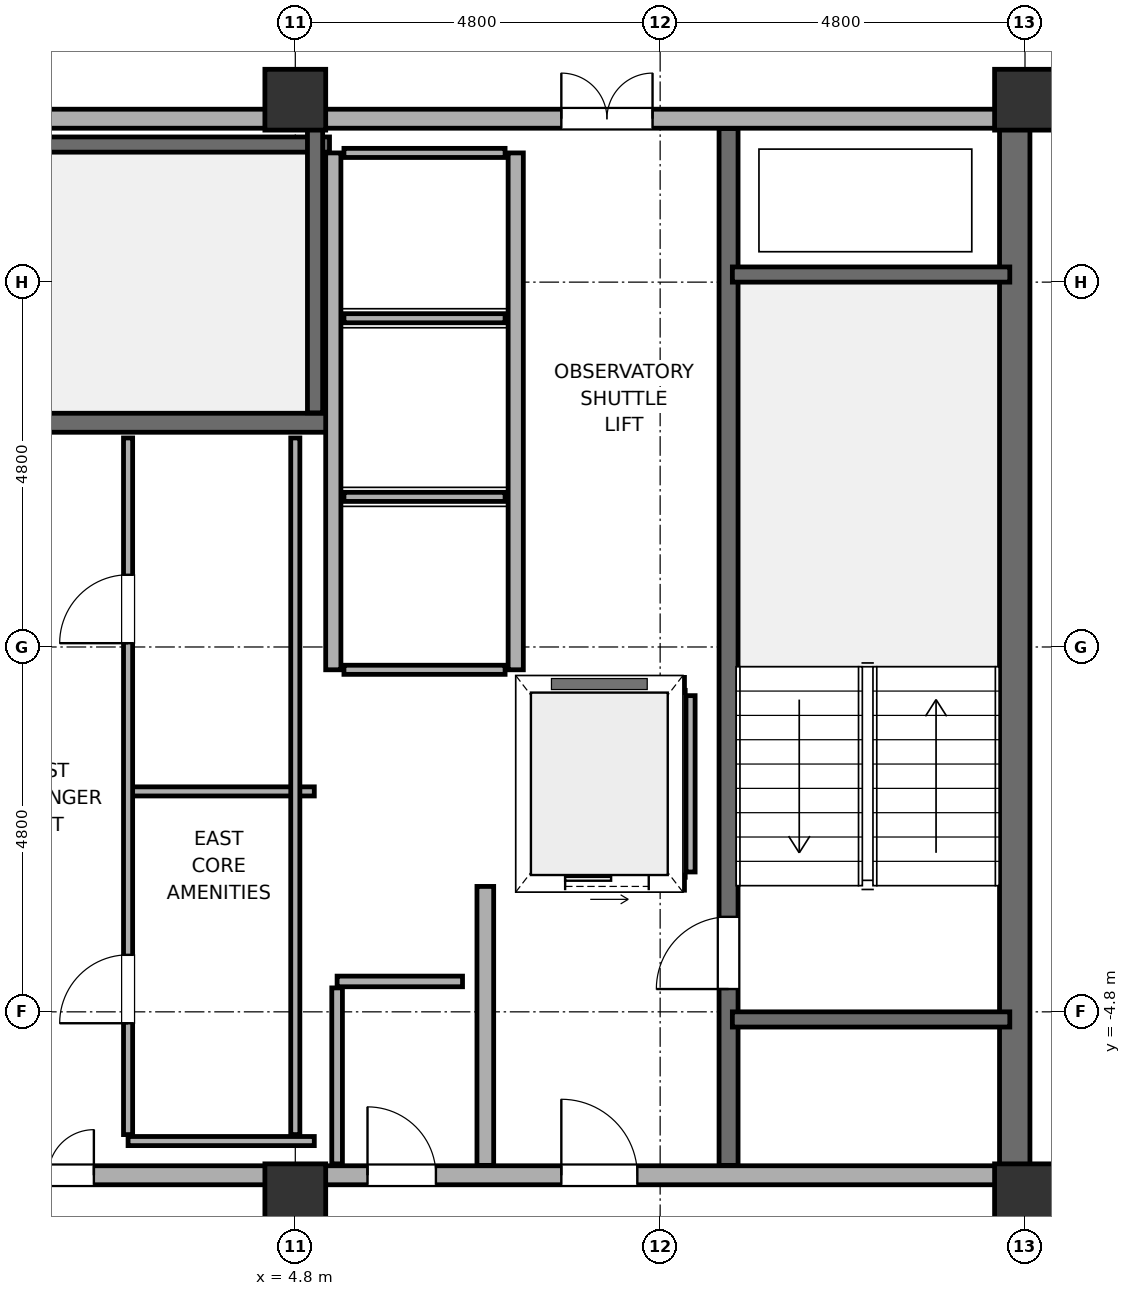
"""IFC4 building model, lengths in metres.
Left out: names, types, materials, properties, quantities, classifications, styles, units other than length and angle.
Written with IfcOpenShell. Run it as: python <this file> out.ifc"""

import sys

from ifc_helpers import new_model, si_unit, direction, frame, frame_2d, origin, origin_2d, place, context, subcontext, project, spatial, rectangle, hollow_rectangle, extrude, element, fill, save


model = new_model("IFC4")
c1 = context("Model", 3, precision=1e-05, world=origin(), true_north=direction((0.0, 1.0)))
c2 = subcontext(c1, "Body", "Model", "MODEL_VIEW")
j1 = project(units=[si_unit("LENGTHUNIT", "METRE"), si_unit("PLANEANGLEUNIT", "RADIAN")], contexts=[c1])
p1 = place(None, origin())
s1 = spatial("IfcSite", under=j1, at=p1, CompositionType="ELEMENT")
p2 = place(p1, origin())
s2 = spatial("IfcBuilding", under=s1, at=p2, CompositionType="ELEMENT")
p3 = place(p2, frame((0.0, 0.0, 30.0)))
s3 = spatial("IfcBuildingStorey", under=s2, at=p3, CompositionType="ELEMENT", Elevation=30.0)
for number, where, z_axis, x_axis in (
    (1, (4.8, -7.2, 0.0), (0.0, 0.0, 1.0), (1.0, 0.0, 0.0)),
    (2, (4.8, 7.2, 0.0), (0.0, 0.0, 1.0), (1.0, 0.0, 0.0)),
    (3, (14.4, -7.2, 0.0), (0.0, 0.0, 1.0), (1.0, 0.0, 0.0)),
    (4, (14.4, 7.2, 0.0), (0.0, 0.0, 1.0), (1.0, 0.0, 0.0)),
):
    element("IfcColumn", number, at=place(p3, frame(where, z_axis=z_axis, x_axis=x_axis)), inside=s3, PredefinedType="COLUMN", context=c2, shape_type="SweptSolid", body=[
        extrude(hollow_rectangle(XDim=0.8, YDim=0.8, WallThickness=0.036, at=origin_2d()), origin(), (0.0, 0.0, 1.0), 3.7),
    ])
p4 = place(p3, frame((14.265, -7.2, -0.18), z_axis=(0.0, 0.0, 1.0), x_axis=(0.0, 1.0, 0.0)))
e5 = element("IfcWall", 5, at=p4, inside=s3, PredefinedType="SHEAR", context=c2, shape_type="SweptSolid", body=[
    extrude(rectangle(XDim=14.4, YDim=0.4, at=frame_2d((7.2, 0.0))), origin(), (0.0, 0.0, 1.0), 3.7),
])
p5 = place(p3, frame((-4.6, -6.95, 0.0), z_axis=(0.0, 0.0, 1.0), x_axis=(1.0, 0.0, 0.0)))
e6 = element("IfcWall", 6, at=p5, inside=s3, PredefinedType="SOLIDWALL", context=c2, shape_type="SweptSolid", body=[
    extrude(rectangle(XDim=9.2, YDim=0.25, at=frame_2d((4.6, 0.0))), origin(), (0.0, 0.0, 1.0), 2.32),
])
p6 = place(p5, frame((0.8, 0.0, 0.0)))
e7 = element("IfcOpeningElement", 7, at=p6, cuts=e6, PredefinedType="OPENING", context=c2, shape_type="SweptSolid", body=[
    extrude(rectangle(XDim=1.2, YDim=2.2, at=frame_2d((0.6, 1.1))), frame((0.0, 0.14, 0.0), z_axis=(0.0, -1.0, 0.0), x_axis=(1.0, 0.0, 0.0)), (0.0, 0.0, 1.0), 0.28),
])
p7 = place(p5, frame((5.55, 0.0, 0.0)))
e8 = element("IfcOpeningElement", 8, at=p7, cuts=e6, PredefinedType="OPENING", context=c2, shape_type="SweptSolid", body=[
    extrude(rectangle(XDim=1.2, YDim=2.2, at=frame_2d((0.6, 1.1))), frame((0.0, 0.14, 0.0), z_axis=(0.0, -1.0, 0.0), x_axis=(1.0, 0.0, 0.0)), (0.0, 0.0, 1.0), 0.28),
])
p8 = place(p3, frame((4.8, -6.95, 0.0), z_axis=(0.0, 0.0, 1.0), x_axis=(1.0, 0.0, 0.0)))
e9 = element("IfcWall", 9, at=p8, inside=s3, PredefinedType="SOLIDWALL", context=c2, shape_type="SweptSolid", body=[
    extrude(rectangle(XDim=9.4, YDim=0.25, at=frame_2d((4.7, 0.0))), origin(), (0.0, 0.0, 1.0), 2.12),
])
p9 = place(p8, frame((3.5, 0.0, 0.0)))
e10 = element("IfcOpeningElement", 10, at=p9, cuts=e9, PredefinedType="OPENING", context=c2, shape_type="SweptSolid", body=[
    extrude(rectangle(XDim=1.0, YDim=2.02, at=frame_2d((0.5, 1.01))), frame((0.0, 0.14, 0.0), z_axis=(0.0, -1.0, 0.0), x_axis=(1.0, 0.0, 0.0)), (0.0, 0.0, 1.0), 0.28),
])
p10 = place(p8, frame((0.95, 0.0, 0.0)))
e11 = element("IfcOpeningElement", 11, at=p10, cuts=e9, PredefinedType="OPENING", context=c2, shape_type="SweptSolid", body=[
    extrude(rectangle(XDim=0.9, YDim=2.02, at=frame_2d((0.45, 1.01))), frame((0.0, 0.14, 0.0), z_axis=(0.0, -1.0, 0.0), x_axis=(1.0, 0.0, 0.0)), (0.0, 0.0, 1.0), 0.28),
])
p11 = place(p3, frame((-4.6, 6.95, 0.0), z_axis=(0.0, 0.0, 1.0), x_axis=(1.0, 0.0, 0.0)))
e12 = element("IfcWall", 12, at=p11, inside=s3, PredefinedType="SOLIDWALL", context=c2, shape_type="SweptSolid", body=[
    extrude(rectangle(XDim=9.2, YDim=0.25, at=frame_2d((4.6, 0.0))), origin(), (0.0, 0.0, 1.0), 2.12),
])
p12 = place(p3, frame((4.8, 6.95, 0.0), z_axis=(0.0, 0.0, 1.0), x_axis=(1.0, 0.0, 0.0)))
e13 = element("IfcWall", 13, at=p12, inside=s3, PredefinedType="SOLIDWALL", context=c2, shape_type="SweptSolid", body=[
    extrude(rectangle(XDim=9.4, YDim=0.25, at=frame_2d((4.7, 0.0))), origin(), (0.0, 0.0, 1.0), 2.12),
])
p13 = place(p12, frame((3.5, 0.0, 0.0)))
e14 = element("IfcOpeningElement", 14, at=p13, cuts=e13, PredefinedType="OPENING", context=c2, shape_type="SweptSolid", body=[
    extrude(rectangle(XDim=1.2, YDim=2.02, at=frame_2d((0.6, 1.01))), frame((0.0, 0.14, 0.0), z_axis=(0.0, -1.0, 0.0), x_axis=(1.0, 0.0, 0.0)), (0.0, 0.0, 1.0), 0.28),
])
p14 = place(p3, frame((7.3, -6.82, 0.0), z_axis=(0.0, 0.0, 1.0), x_axis=(0.0, 1.0, 0.0)))
e15 = element("IfcWall", 15, at=p14, inside=s3, PredefinedType="SOLIDWALL", context=c2, shape_type="SweptSolid", body=[
    extrude(rectangle(XDim=3.67, YDim=0.22, at=frame_2d((1.835, 0.0))), origin(), (0.0, 0.0, 1.0), 2.12),
])
p15 = place(p3, frame((10.5, -6.82, -0.18), z_axis=(0.0, 0.0, 1.0), x_axis=(0.0, 1.0, 0.0)))
e16 = element("IfcWall", 16, at=p15, inside=s3, PredefinedType="SOLIDWALL", context=c2, shape_type="SweptSolid", body=[
    extrude(rectangle(XDim=13.64, YDim=0.25, at=frame_2d((6.82, 0.0))), origin(), (0.0, 0.0, 1.0), 3.7),
])
p16 = place(p15, frame((2.32, 0.0, 0.18)))
e17 = element("IfcOpeningElement", 17, at=p16, cuts=e16, PredefinedType="OPENING", context=c2, shape_type="SweptSolid", body=[
    extrude(rectangle(XDim=0.95, YDim=2.15, at=frame_2d((0.475, 1.075))), frame((0.0, 0.14, 0.0), z_axis=(0.0, -1.0, 0.0), x_axis=(1.0, 0.0, 0.0)), (0.0, 0.0, 1.0), 0.28),
])
for number, where, z_axis, x_axis in (
    (18, (10.55, -4.9, -0.18), (0.0, 0.0, 1.0), (1.0, 0.0, 0.0)),
    (19, (10.55, 4.9, -0.18), (0.0, 0.0, 1.0), (1.0, 0.0, 0.0)),
):
    element("IfcWall", number, at=place(p3, frame(where, z_axis=z_axis, x_axis=x_axis)), inside=s3, PredefinedType="SOLIDWALL", context=c2, shape_type="SweptSolid", body=[
        extrude(rectangle(XDim=3.65, YDim=0.2, at=frame_2d((1.825, 0.0))), origin(), (0.0, 0.0, 1.0), 3.7),
    ])
p17 = place(p3, frame((-4.65, 2.95, -0.18), z_axis=(0.0, 0.0, 1.0), x_axis=(1.0, 0.0, 0.0)))
e20 = element("IfcWall", 20, at=p17, inside=s3, PredefinedType="SOLIDWALL", context=c2, shape_type="SweptSolid", body=[
    extrude(rectangle(XDim=9.9, YDim=0.25, at=frame_2d((4.95, 0.0))), origin(), (0.0, 0.0, 1.0), 3.7),
])
p18 = place(p17, frame((0.65, 0.0, 0.18)))
e21 = element("IfcOpeningElement", 21, at=p18, cuts=e20, PredefinedType="OPENING", context=c2, shape_type="SweptSolid", body=[
    extrude(rectangle(XDim=0.95, YDim=2.15, at=frame_2d((0.475, 1.075))), frame((0.0, 0.14, 0.0), z_axis=(0.0, -1.0, 0.0), x_axis=(1.0, 0.0, 0.0)), (0.0, 0.0, 1.0), 0.28),
])
p19 = place(p3, frame((-4.65, 6.61, -0.18), z_axis=(0.0, 0.0, 1.0), x_axis=(1.0, 0.0, 0.0)))
e22 = element("IfcWall", 22, at=p19, inside=s3, PredefinedType="SOLIDWALL", context=c2, shape_type="SweptSolid", body=[
    extrude(rectangle(XDim=9.9, YDim=0.2, at=frame_2d((4.95, 0.0))), origin(), (0.0, 0.0, 1.0), 3.7),
])
p20 = place(p3, frame((5.06, 3.08, -0.18), z_axis=(0.0, 0.0, 1.0), x_axis=(0.0, 1.0, 0.0)))
e23 = element("IfcWall", 23, at=p20, inside=s3, PredefinedType="SOLIDWALL", context=c2, shape_type="SweptSolid", body=[
    extrude(rectangle(XDim=3.74, YDim=0.2, at=frame_2d((1.87, 0.0))), origin(), (0.0, 0.0, 1.0), 3.7),
])
for number, where, z_axis, x_axis in (
    (24, (7.7, -0.3, 0.0), (0.0, 0.0, 1.0), (0.0, 1.0, 0.0)),
    (25, (5.3, -0.3, 0.0), (0.0, 0.0, 1.0), (0.0, 1.0, 0.0)),
):
    element("IfcWall", number, at=place(p3, frame(where, z_axis=z_axis, x_axis=x_axis)), inside=s3, PredefinedType="SOLIDWALL", context=c2, shape_type="SweptSolid", body=[
        extrude(rectangle(XDim=6.8, YDim=0.2, at=frame_2d((3.4, 0.0))), origin(), (0.0, 0.0, 1.0), 3.52),
    ])
for number, where, z_axis, x_axis in (
    (26, (5.44, -0.3, 0.0), (0.0, 0.0, 1.0), (1.0, 0.0, 0.0)),
    (27, (5.44, 1.975, 0.0), (0.0, 0.0, 1.0), (1.0, 0.0, 0.0)),
    (28, (5.44, 4.325, 0.0), (0.0, 0.0, 1.0), (1.0, 0.0, 0.0)),
    (29, (5.44, 6.5, 0.0), (0.0, 0.0, 1.0), (1.0, 0.0, 0.0)),
):
    element("IfcWall", number, at=place(p3, frame(where, z_axis=z_axis, x_axis=x_axis)), inside=s3, PredefinedType="PARTITIONING", context=c2, shape_type="SweptSolid", body=[
        extrude(rectangle(XDim=2.12, YDim=0.12, at=frame_2d((1.06, 0.0))), origin(), (0.0, 0.0, 1.0), 3.52),
    ])
p21 = place(p3, frame((7.88, -3.1, 0.0), z_axis=(0.0, 0.0, 1.0), x_axis=(1.0, 0.0, 0.0)))
e30 = element("IfcWall", 30, at=p21, inside=s3, PredefinedType="SOLIDWALL", context=c2, shape_type="SweptSolid", body=[
    extrude(rectangle(XDim=2.04, YDim=0.2, at=frame_2d((1.02, 0.0))), origin(), (0.0, 0.0, 1.0), 3.52),
])
p22 = place(p21, frame((0.47, 0.0, 0.0)))
e31 = element("IfcOpeningElement", 31, at=p22, cuts=e30, PredefinedType="OPENING", context=c2, shape_type="SweptSolid", body=[
    extrude(rectangle(XDim=1.1, YDim=2.2, at=frame_2d((0.55, 1.1))), frame((0.0, 0.115, 0.0), z_axis=(0.0, -1.0, 0.0), x_axis=(1.0, 0.0, 0.0)), (0.0, 0.0, 1.0), 0.23),
])
p23 = place(p3, frame((7.88, -0.5, 0.0), z_axis=(0.0, 0.0, 1.0), x_axis=(1.0, 0.0, 0.0)))
e32 = element("IfcWall", 32, at=p23, inside=s3, PredefinedType="SOLIDWALL", context=c2, shape_type="SweptSolid", body=[
    extrude(rectangle(XDim=2.04, YDim=0.2, at=frame_2d((1.02, 0.0))), origin(), (0.0, 0.0, 1.0), 3.52),
])
for number, where, z_axis, x_axis in (
    (33, (7.8, -2.96, 0.0), (0.0, 0.0, 1.0), (0.0, 1.0, 0.0)),
    (34, (10.0, -2.96, 0.0), (0.0, 0.0, 1.0), (0.0, 1.0, 0.0)),
):
    element("IfcWall", number, at=place(p3, frame(where, z_axis=z_axis, x_axis=x_axis)), inside=s3, PredefinedType="PARTITIONING", context=c2, shape_type="SweptSolid", body=[
        extrude(rectangle(XDim=2.32, YDim=0.12, at=frame_2d((1.16, 0.0))), origin(), (0.0, 0.0, 1.0), 3.52),
    ])
p24 = place(p3, frame((2.6, -6.5, 0.0), z_axis=(0.0, 0.0, 1.0), x_axis=(1.0, 0.0, 0.0)))
e35 = element("IfcWall", 35, at=p24, inside=s3, PredefinedType="PARTITIONING", context=c2, shape_type="SweptSolid", body=[
    extrude(rectangle(XDim=2.45, YDim=0.12, at=frame_2d((1.225, 0.0))), origin(), (0.0, 0.0, 1.0), 3.52),
])
p25 = place(p3, frame((5.35, -4.4, 0.0), z_axis=(0.0, 0.0, 1.0), x_axis=(1.0, 0.0, 0.0)))
e36 = element("IfcWall", 36, at=p25, inside=s3, PredefinedType="PLUMBINGWALL", context=c2, shape_type="SweptSolid", body=[
    extrude(rectangle(XDim=1.65, YDim=0.14, at=frame_2d((0.825, 0.0))), origin(), (0.0, 0.0, 1.0), 3.52),
])
p26 = place(p3, frame((2.6, -1.9, 0.0), z_axis=(0.0, 0.0, 1.0), x_axis=(1.0, 0.0, 0.0)))
e37 = element("IfcWall", 37, at=p26, inside=s3, PredefinedType="PARTITIONING", context=c2, shape_type="SweptSolid", body=[
    extrude(rectangle(XDim=2.45, YDim=0.12, at=frame_2d((1.225, 0.0))), origin(), (0.0, 0.0, 1.0), 3.52),
])
p27 = place(p3, frame((2.6, -6.415, 0.0), z_axis=(0.0, 0.0, 1.0), x_axis=(0.0, 1.0, 0.0)))
e38 = element("IfcWall", 38, at=p27, inside=s3, PredefinedType="PARTITIONING", context=c2, shape_type="SweptSolid", body=[
    extrude(rectangle(XDim=9.165, YDim=0.12, at=frame_2d((4.583, 0.0))), origin(), (0.0, 0.0, 1.0), 3.52),
])
p28 = place(p27, frame((1.465, 0.0, 0.0)))
e39 = element("IfcOpeningElement", 39, at=p28, cuts=e38, PredefinedType="OPENING", context=c2, shape_type="SweptSolid", body=[
    extrude(rectangle(XDim=0.9, YDim=2.1, at=frame_2d((0.45, 1.05))), frame((0.0, 0.075, 0.0), z_axis=(0.0, -1.0, 0.0), x_axis=(1.0, 0.0, 0.0)), (0.0, 0.0, 1.0), 0.15),
])
p29 = place(p27, frame((6.465, 0.0, 0.0)))
e40 = element("IfcOpeningElement", 40, at=p29, cuts=e38, PredefinedType="OPENING", context=c2, shape_type="SweptSolid", body=[
    extrude(rectangle(XDim=0.9, YDim=2.1, at=frame_2d((0.45, 1.05))), frame((0.0, 0.075, 0.0), z_axis=(0.0, -1.0, 0.0), x_axis=(1.0, 0.0, 0.0)), (0.0, 0.0, 1.0), 0.15),
])
p30 = place(p3, frame((4.8, -6.415, 0.0), z_axis=(0.0, 0.0, 1.0), x_axis=(0.0, 1.0, 0.0)))
e41 = element("IfcWall", 41, at=p30, inside=s3, PredefinedType="PARTITIONING", context=c2, shape_type="SweptSolid", body=[
    extrude(rectangle(XDim=9.165, YDim=0.12, at=frame_2d((4.583, 0.0))), origin(), (0.0, 0.0, 1.0), 3.52),
])
p31 = place(p3, frame((5.35, -6.8, 0.0), z_axis=(0.0, 0.0, 1.0), x_axis=(0.0, 1.0, 0.0)))
e42 = element("IfcWall", 42, at=p31, inside=s3, PredefinedType="PLUMBINGWALL", context=c2, shape_type="SweptSolid", body=[
    extrude(rectangle(XDim=2.315, YDim=0.14, at=frame_2d((1.157, 0.0))), origin(), (0.0, 0.0, 1.0), 2.12),
])
p32 = place(p9, origin())
e43 = element("IfcDoor", 43, at=p32, inside=s3, OperationType="SINGLE_SWING_LEFT", PredefinedType="DOOR", context=c2, shape_type="SweptSolid", body=[
    extrude(rectangle(XDim=1.0, YDim=2.02, at=frame_2d((0.5, 1.01))), frame((0.0, 0.025, 0.0), z_axis=(0.0, -1.0, 0.0), x_axis=(1.0, 0.0, 0.0)), (0.0, 0.0, 1.0), 0.05),
])
fill(e10, e43)
p33 = place(p7, origin())
e44 = element("IfcDoor", 44, at=p33, inside=s3, OperationType="DOUBLE_DOOR_SINGLE_SWING", PredefinedType="DOOR", context=c2, shape_type="SweptSolid", body=[
    extrude(rectangle(XDim=1.2, YDim=2.2, at=frame_2d((0.6, 1.1))), frame((0.0, 0.025, 0.0), z_axis=(0.0, -1.0, 0.0), x_axis=(1.0, 0.0, 0.0)), (0.0, 0.0, 1.0), 0.05),
])
fill(e8, e44)
p34 = place(p13, origin())
e45 = element("IfcDoor", 45, at=p34, inside=s3, OperationType="DOUBLE_DOOR_SINGLE_SWING", PredefinedType="DOOR", context=c2, shape_type="SweptSolid", body=[
    extrude(rectangle(XDim=1.2, YDim=2.02, at=frame_2d((0.6, 1.01))), frame((0.0, 0.025, 0.0), z_axis=(0.0, -1.0, 0.0), x_axis=(1.0, 0.0, 0.0)), (0.0, 0.0, 1.0), 0.05),
])
fill(e14, e45)
p35 = place(p16, origin())
e46 = element("IfcDoor", 46, at=p35, inside=s3, OperationType="SINGLE_SWING_LEFT", PredefinedType="DOOR", context=c2, shape_type="SweptSolid", body=[
    extrude(rectangle(XDim=0.95, YDim=2.15, at=frame_2d((0.475, 1.075))), frame((0.0, 0.025, 0.0), z_axis=(0.0, -1.0, 0.0), x_axis=(1.0, 0.0, 0.0)), (0.0, 0.0, 1.0), 0.05),
])
fill(e17, e46)
p36 = place(p22, origin())
e47 = element("IfcDoor", 47, at=p36, inside=s3, OperationType="SLIDING_TO_LEFT", PredefinedType="DOOR", context=c2, shape_type="SweptSolid", body=[
    extrude(rectangle(XDim=1.1, YDim=2.2, at=frame_2d((0.55, 1.1))), frame((0.0, 0.025, 0.0), z_axis=(0.0, -1.0, 0.0), x_axis=(1.0, 0.0, 0.0)), (0.0, 0.0, 1.0), 0.05),
])
fill(e31, e47)
p37 = place(p28, origin())
e48 = element("IfcDoor", 48, at=p37, inside=s3, OperationType="SINGLE_SWING_RIGHT", PredefinedType="DOOR", context=c2, shape_type="SweptSolid", body=[
    extrude(rectangle(XDim=0.9, YDim=2.1, at=frame_2d((0.45, 1.05))), frame((0.0, 0.025, 0.0), z_axis=(0.0, -1.0, 0.0), x_axis=(1.0, 0.0, 0.0)), (0.0, 0.0, 1.0), 0.05),
])
fill(e39, e48)
p38 = place(p29, origin())
e49 = element("IfcDoor", 49, at=p38, inside=s3, OperationType="SINGLE_SWING_LEFT", PredefinedType="DOOR", context=c2, shape_type="SweptSolid", body=[
    extrude(rectangle(XDim=0.9, YDim=2.1, at=frame_2d((0.45, 1.05))), frame((0.0, 0.025, 0.0), z_axis=(0.0, -1.0, 0.0), x_axis=(1.0, 0.0, 0.0)), (0.0, 0.0, 1.0), 0.05),
])
fill(e40, e49)
p39 = place(p10, origin())
e50 = element("IfcDoor", 50, at=p39, inside=s3, OperationType="SINGLE_SWING_LEFT", PredefinedType="DOOR", context=c2, shape_type="SweptSolid", body=[
    extrude(rectangle(XDim=0.9, YDim=2.02, at=frame_2d((0.45, 1.01))), frame((0.0, 0.025, 0.0), z_axis=(0.0, -1.0, 0.0), x_axis=(1.0, 0.0, 0.0)), (0.0, 0.0, 1.0), 0.05),
])
fill(e11, e50)
save(model, sys.argv[1])
